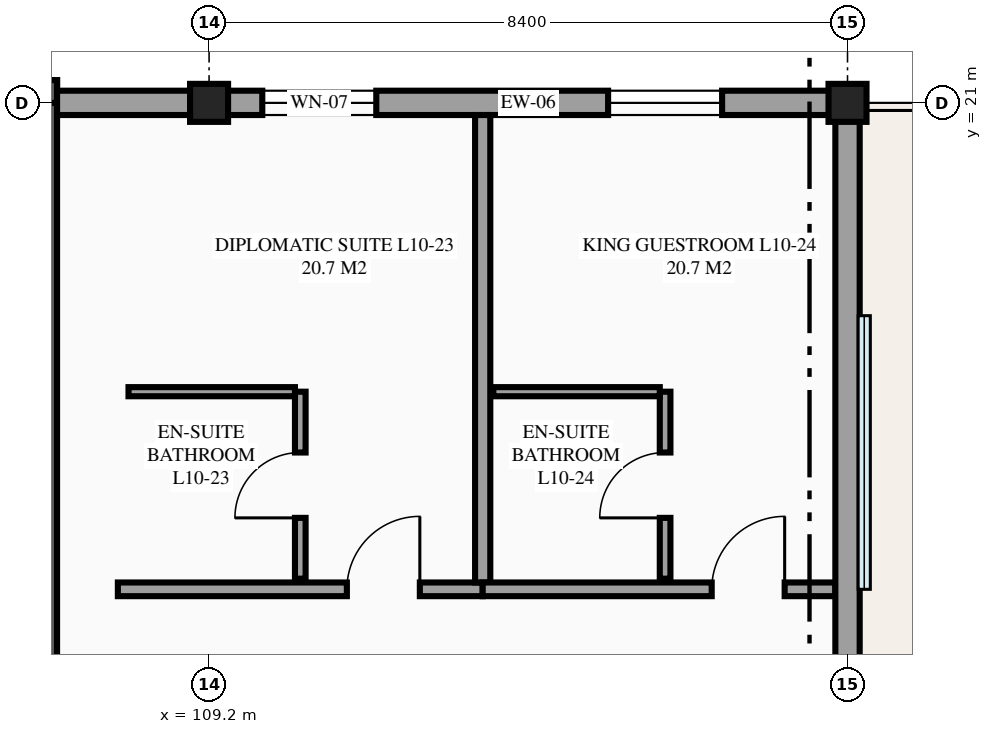
"""IFC4 building model, lengths in metres.
Left out: names, types, materials, properties, quantities, classifications, styles, units other than length and angle.
Written with IfcOpenShell. Run it as: python <this file> out.ifc"""

import sys

from ifc_helpers import new_model, si_unit, direction, frame, frame_2d, origin, origin_2d, place, context, subcontext, project, spatial, rectangle, extrude, element, fill, save


model = new_model("IFC4")
c1 = context("Model", 3, precision=1e-05, world=origin(), true_north=direction((0.0, 1.0)))
c2 = subcontext(c1, "Body", "Model", "MODEL_VIEW")
j1 = project(units=[si_unit("LENGTHUNIT", "METRE"), si_unit("PLANEANGLEUNIT", "RADIAN")], contexts=[c1])
p1 = place(None, origin())
s1 = spatial("IfcSite", under=j1, at=p1, CompositionType="ELEMENT")
p2 = place(p1, origin())
s2 = spatial("IfcBuilding", under=s1, at=p2, CompositionType="ELEMENT")
p3 = place(p2, frame((0.0, 0.0, 39.9)))
s3 = spatial("IfcBuildingStorey", under=s2, at=p3, CompositionType="ELEMENT", Elevation=39.9)
for number, where, z_axis, x_axis in (
    (1, (109.2, 21.0, 0.0), (0.0, 0.0, 1.0), (1.0, 0.0, 0.0)),
    (2, (117.6, 21.0, 0.0), (0.0, 0.0, 1.0), (1.0, 0.0, 0.0)),
):
    element("IfcColumn", number, at=place(p3, frame(where, z_axis=z_axis, x_axis=x_axis)), inside=s3, PredefinedType="COLUMN", context=c2, shape_type="SweptSolid", body=[
        extrude(rectangle(XDim=0.5, YDim=0.5, at=origin_2d()), origin(), (0.0, 0.0, 1.0), 3.6),
    ])
p4 = place(p3, frame((117.6, 21.0, 0.0), z_axis=(0.0, 0.0, 1.0), x_axis=(-1.0, 0.0, 0.0)))
e3 = element("IfcWall", 3, at=p4, inside=s3, PredefinedType="STANDARD", context=c2, shape_type="SweptSolid", body=[
    extrude(rectangle(XDim=8.4, YDim=0.32, at=frame_2d((4.2, 0.0))), origin(), (0.0, 0.0, 1.0), 2.43),
])
p5 = place(p4, frame((6.2, 0.0, 0.85)))
e4 = element("IfcOpeningElement", 4, at=p5, cuts=e3, PredefinedType="OPENING", context=c2, shape_type="SweptSolid", body=[
    extrude(rectangle(XDim=1.5, YDim=1.5, at=frame_2d((0.75, 0.75))), frame((0.0, 0.17, 0.0), z_axis=(0.0, -1.0, 0.0), x_axis=(1.0, 0.0, 0.0)), (0.0, 0.0, 1.0), 0.34),
])
p6 = place(p4, frame((1.65, 0.0, 0.85)))
e5 = element("IfcOpeningElement", 5, at=p6, cuts=e3, PredefinedType="OPENING", context=c2, shape_type="SweptSolid", body=[
    extrude(rectangle(XDim=1.5, YDim=1.5, at=frame_2d((0.75, 0.75))), frame((0.0, 0.17, 0.0), z_axis=(0.0, -1.0, 0.0), x_axis=(1.0, 0.0, 0.0)), (0.0, 0.0, 1.0), 0.34),
])
p7 = place(p3, frame((107.05, 12.46, 0.0), z_axis=(0.0, 0.0, 1.0), x_axis=(0.0, 1.0, 0.0)))
e6 = element("IfcWall", 6, at=p7, inside=s3, PredefinedType="SHEAR", context=c2, shape_type="SweptSolid", body=[
    extrude(rectangle(XDim=8.84, YDim=0.3, at=frame_2d((4.42, 0.0))), origin(), (0.0, 0.0, 1.0), 3.6),
])
p8 = place(p3, frame((107.2, 21.15, 0.0), z_axis=(0.0, 0.0, 1.0), x_axis=(-1.0, 0.0, 0.0)))
e7 = element("IfcWall", 7, at=p8, inside=s3, PredefinedType="SHEAR", context=c2, shape_type="SweptSolid", body=[
    extrude(rectangle(XDim=5.2, YDim=0.3, at=frame_2d((2.6, 0.0))), origin(), (0.0, 0.0, 1.0), 3.6),
])
p9 = place(p3, frame((108.0, 14.6, 0.0), z_axis=(0.0, 0.0, 1.0), x_axis=(1.0, 0.0, 0.0)))
e8 = element("IfcWall", 8, at=p9, inside=s3, PredefinedType="PARTITIONING", context=c2, shape_type="SweptSolid", body=[
    extrude(rectangle(XDim=4.8, YDim=0.18, at=frame_2d((2.4, 0.0))), origin(), (0.0, 0.0, 1.0), 3.375),
])
p10 = place(p9, frame((3.013, 0.0, 0.0)))
e9 = element("IfcOpeningElement", 9, at=p10, cuts=e8, PredefinedType="OPENING", context=c2, shape_type="SweptSolid", body=[
    extrude(rectangle(XDim=0.96, YDim=2.15, at=frame_2d((0.48, 1.075))), frame((0.0, 0.1, 0.0), z_axis=(0.0, -1.0, 0.0), x_axis=(1.0, 0.0, 0.0)), (0.0, 0.0, 1.0), 0.2),
])
p11 = place(p3, frame((112.8, 14.69, 0.0), z_axis=(0.0, 0.0, 1.0), x_axis=(0.0, 1.0, 0.0)))
e10 = element("IfcWall", 10, at=p11, inside=s3, PredefinedType="PARTITIONING", context=c2, shape_type="SweptSolid", body=[
    extrude(rectangle(XDim=6.15, YDim=0.2, at=frame_2d((3.075, 0.0))), origin(), (0.0, 0.0, 1.0), 3.375),
])
p12 = place(p3, frame((110.4, 14.74, 0.0), z_axis=(0.0, 0.0, 1.0), x_axis=(0.0, 1.0, 0.0)))
e11 = element("IfcWall", 11, at=p12, inside=s3, PredefinedType="PARTITIONING", context=c2, shape_type="SweptSolid", body=[
    extrude(rectangle(XDim=2.46, YDim=0.14, at=frame_2d((1.23, 0.0))), origin(), (0.0, 0.0, 1.0), 3.375),
])
p13 = place(p12, frame((0.8, 0.0, 0.0)))
e12 = element("IfcOpeningElement", 12, at=p13, cuts=e11, PredefinedType="OPENING", context=c2, shape_type="SweptSolid", body=[
    extrude(rectangle(XDim=0.86, YDim=2.1, at=frame_2d((0.43, 1.05))), frame((0.0, 0.08, 0.0), z_axis=(0.0, -1.0, 0.0), x_axis=(1.0, 0.0, 0.0)), (0.0, 0.0, 1.0), 0.16),
])
p14 = place(p3, frame((108.14, 17.2, 0.0), z_axis=(0.0, 0.0, 1.0), x_axis=(1.0, 0.0, 0.0)))
e13 = element("IfcWall", 13, at=p14, inside=s3, PredefinedType="PARTITIONING", context=c2, shape_type="SweptSolid", body=[
    extrude(rectangle(XDim=2.19, YDim=0.12, at=frame_2d((1.095, 0.0))), origin(), (0.0, 0.0, 1.0), 3.375),
])
p15 = place(p3, frame((112.8, 14.6, 0.0), z_axis=(0.0, 0.0, 1.0), x_axis=(1.0, 0.0, 0.0)))
e14 = element("IfcWall", 14, at=p15, inside=s3, PredefinedType="PARTITIONING", context=c2, shape_type="SweptSolid", body=[
    extrude(rectangle(XDim=4.64, YDim=0.18, at=frame_2d((2.32, 0.0))), origin(), (0.0, 0.0, 1.0), 3.375),
])
p16 = place(p15, frame((3.013, 0.0, 0.0)))
e15 = element("IfcOpeningElement", 15, at=p16, cuts=e14, PredefinedType="OPENING", context=c2, shape_type="SweptSolid", body=[
    extrude(rectangle(XDim=0.96, YDim=2.15, at=frame_2d((0.48, 1.075))), frame((0.0, 0.1, 0.0), z_axis=(0.0, -1.0, 0.0), x_axis=(1.0, 0.0, 0.0)), (0.0, 0.0, 1.0), 0.2),
])
p17 = place(p3, frame((115.2, 14.74, 0.0), z_axis=(0.0, 0.0, 1.0), x_axis=(0.0, 1.0, 0.0)))
e16 = element("IfcWall", 16, at=p17, inside=s3, PredefinedType="PARTITIONING", context=c2, shape_type="SweptSolid", body=[
    extrude(rectangle(XDim=2.46, YDim=0.14, at=frame_2d((1.23, 0.0))), origin(), (0.0, 0.0, 1.0), 3.375),
])
p18 = place(p17, frame((0.8, 0.0, 0.0)))
e17 = element("IfcOpeningElement", 17, at=p18, cuts=e16, PredefinedType="OPENING", context=c2, shape_type="SweptSolid", body=[
    extrude(rectangle(XDim=0.86, YDim=2.1, at=frame_2d((0.43, 1.05))), frame((0.0, 0.08, 0.0), z_axis=(0.0, -1.0, 0.0), x_axis=(1.0, 0.0, 0.0)), (0.0, 0.0, 1.0), 0.16),
])
p19 = place(p3, frame((112.94, 17.2, 0.0), z_axis=(0.0, 0.0, 1.0), x_axis=(1.0, 0.0, 0.0)))
e18 = element("IfcWall", 18, at=p19, inside=s3, PredefinedType="PARTITIONING", context=c2, shape_type="SweptSolid", body=[
    extrude(rectangle(XDim=2.19, YDim=0.12, at=frame_2d((1.095, 0.0))), origin(), (0.0, 0.0, 1.0), 3.375),
])
p20 = place(p3, frame((117.6, 12.6, 0.0), z_axis=(0.0, 0.0, 1.0), x_axis=(0.0, 1.0, 0.0)))
e19 = element("IfcWall", 19, at=p20, inside=s3, PredefinedType="STANDARD", context=c2, shape_type="SweptSolid", body=[
    extrude(rectangle(XDim=8.4, YDim=0.32, at=frame_2d((4.2, 0.0))), origin(), (0.0, 0.0, 1.0), 2.53),
])
p21 = place(p3, frame((109.2, 21.0, 0.0), z_axis=(0.0, 0.0, 1.0), x_axis=(-1.0, 0.0, 0.0)))
e20 = element("IfcWall", 20, at=p21, inside=s3, PredefinedType="STANDARD", context=c2, shape_type="SweptSolid", body=[
    extrude(rectangle(XDim=2.0, YDim=0.32, at=frame_2d((1.0, 0.0))), origin(), (0.0, 0.0, 1.0), 2.78),
])
p22 = place(p5, origin())
e21 = element("IfcWindow", 21, at=p22, inside=s3, PartitioningType="SINGLE_PANEL", PredefinedType="WINDOW", context=c2, shape_type="SweptSolid", body=[
    extrude(rectangle(XDim=1.5, YDim=1.5, at=frame_2d((0.75, 0.75))), frame((0.0, 0.03, 0.0), z_axis=(0.0, -1.0, 0.0), x_axis=(1.0, 0.0, 0.0)), (0.0, 0.0, 1.0), 0.06),
])
fill(e4, e21)
p23 = place(p6, origin())
e22 = element("IfcWindow", 22, at=p23, inside=s3, PartitioningType="SINGLE_PANEL", PredefinedType="WINDOW", context=c2, shape_type="SweptSolid", body=[
    extrude(rectangle(XDim=1.5, YDim=1.5, at=frame_2d((0.75, 0.75))), frame((0.0, 0.03, 0.0), z_axis=(0.0, -1.0, 0.0), x_axis=(1.0, 0.0, 0.0)), (0.0, 0.0, 1.0), 0.06),
])
fill(e5, e22)
p24 = place(p10, origin())
e23 = element("IfcDoor", 23, at=p24, inside=s3, OperationType="SINGLE_SWING_RIGHT", PredefinedType="DOOR", context=c2, shape_type="SweptSolid", body=[
    extrude(rectangle(XDim=0.96, YDim=2.15, at=frame_2d((0.48, 1.075))), frame((0.0, 0.025, 0.0), z_axis=(0.0, -1.0, 0.0), x_axis=(1.0, 0.0, 0.0)), (0.0, 0.0, 1.0), 0.05),
])
fill(e9, e23)
p25 = place(p13, origin())
e24 = element("IfcDoor", 24, at=p25, inside=s3, OperationType="SINGLE_SWING_LEFT", PredefinedType="DOOR", context=c2, shape_type="SweptSolid", body=[
    extrude(rectangle(XDim=0.86, YDim=2.1, at=frame_2d((0.43, 1.05))), frame((0.0, 0.025, 0.0), z_axis=(0.0, -1.0, 0.0), x_axis=(1.0, 0.0, 0.0)), (0.0, 0.0, 1.0), 0.05),
])
fill(e12, e24)
p26 = place(p16, origin())
e25 = element("IfcDoor", 25, at=p26, inside=s3, OperationType="SINGLE_SWING_RIGHT", PredefinedType="DOOR", context=c2, shape_type="SweptSolid", body=[
    extrude(rectangle(XDim=0.96, YDim=2.15, at=frame_2d((0.48, 1.075))), frame((0.0, 0.025, 0.0), z_axis=(0.0, -1.0, 0.0), x_axis=(1.0, 0.0, 0.0)), (0.0, 0.0, 1.0), 0.05),
])
fill(e15, e25)
p27 = place(p18, origin())
e26 = element("IfcDoor", 26, at=p27, inside=s3, OperationType="SINGLE_SWING_LEFT", PredefinedType="DOOR", context=c2, shape_type="SweptSolid", body=[
    extrude(rectangle(XDim=0.86, YDim=2.1, at=frame_2d((0.43, 1.05))), frame((0.0, 0.025, 0.0), z_axis=(0.0, -1.0, 0.0), x_axis=(1.0, 0.0, 0.0)), (0.0, 0.0, 1.0), 0.05),
])
fill(e17, e26)
save(model, sys.argv[1])
